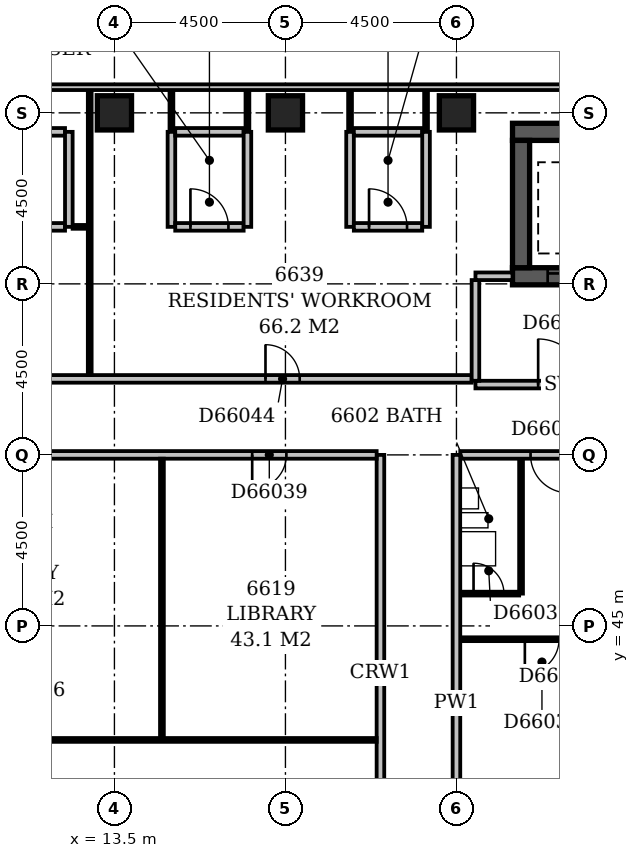
"""IFC4 building model, lengths in metres.
Left out: names, types, materials, properties, quantities, classifications, styles, units other than length and angle.
Written with IfcOpenShell. Run it as: python <this file> out.ifc"""

import sys

from ifc_helpers import new_model, si_unit, direction, frame, frame_2d, origin, origin_2d, place, context, subcontext, project, spatial, rectangle, extrude, element, fill, save


model = new_model("IFC4")
c1 = context("Model", 3, precision=1e-05, world=origin(), true_north=direction((0.0, 1.0)))
c2 = subcontext(c1, "Body", "Model", "MODEL_VIEW")
j1 = project(units=[si_unit("LENGTHUNIT", "METRE"), si_unit("PLANEANGLEUNIT", "RADIAN")], contexts=[c1])
p1 = place(None, origin())
s1 = spatial("IfcSite", under=j1, at=p1, CompositionType="ELEMENT")
p2 = place(p1, origin())
s2 = spatial("IfcBuilding", under=s1, at=p2, CompositionType="ELEMENT")
p3 = place(p2, frame((0.0, 0.0, 254.6)))
s3 = spatial("IfcBuildingStorey", under=s2, at=p3, CompositionType="ELEMENT", Elevation=254.6)
p4 = place(p3, frame((23.975, 54.2, -0.3), z_axis=(0.0, 0.0, 1.0), x_axis=(1.0, 0.0, 0.0)))
e1 = element("IfcWall", 1, at=p4, inside=s3, PredefinedType="SHEAR", context=c2, shape_type="SweptSolid", body=[
    extrude(rectangle(XDim=2.95, YDim=0.45, at=frame_2d((1.475, 0.0))), origin(), (0.0, 0.0, 1.0), 3.45),
])
p5 = place(p4, frame((0.925, 0.0, 0.3)))
e2 = element("IfcOpeningElement", 2, at=p5, cuts=e1, PredefinedType="OPENING", context=c2, shape_type="SweptSolid", body=[
    extrude(rectangle(XDim=1.1, YDim=2.1, at=frame_2d((0.55, 1.05))), frame((0.0, 0.237, 0.0), z_axis=(0.0, -1.0, 0.0), x_axis=(1.0, 0.0, 0.0)), (0.0, 0.0, 1.0), 0.474),
])
p6 = place(p3, frame((23.975, 58.0, -0.3), z_axis=(0.0, 0.0, 1.0), x_axis=(1.0, 0.0, 0.0)))
e3 = element("IfcWall", 3, at=p6, inside=s3, PredefinedType="SHEAR", context=c2, shape_type="SweptSolid", body=[
    extrude(rectangle(XDim=2.95, YDim=0.45, at=frame_2d((1.475, 0.0))), origin(), (0.0, 0.0, 1.0), 3.45),
])
p7 = place(p3, frame((24.2, 54.425, -0.3), z_axis=(0.0, 0.0, 1.0), x_axis=(0.0, 1.0, 0.0)))
e4 = element("IfcWall", 4, at=p7, inside=s3, PredefinedType="SHEAR", context=c2, shape_type="SweptSolid", body=[
    extrude(rectangle(XDim=3.35, YDim=0.45, at=frame_2d((1.675, 0.0))), origin(), (0.0, 0.0, 1.0), 3.45),
])
for number, where, z_axis, x_axis in (
    (5, (13.5, 58.5, -0.3), (0.0, 0.0, 1.0), (1.0, 0.0, 0.0)),
    (6, (18.0, 58.5, -0.3), (0.0, 0.0, 1.0), (1.0, 0.0, 0.0)),
    (7, (22.5, 58.5, -0.3), (0.0, 0.0, 1.0), (1.0, 0.0, 0.0)),
):
    element("IfcColumn", number, at=place(p3, frame(where, z_axis=z_axis, x_axis=x_axis)), inside=s3, PredefinedType="COLUMN", context=c2, shape_type="SweptSolid", body=[
        extrude(rectangle(XDim=0.9, YDim=0.9, at=origin_2d()), origin(), (0.0, 0.0, 1.0), 3.45),
    ])
p8 = place(p3, frame((45.6, 59.175, 0.0), z_axis=(0.0, 0.0, 1.0), x_axis=(-1.0, 0.0, 0.0)))
e8 = element("IfcWall", 8, at=p8, inside=s3, PredefinedType="STANDARD", context=c2, shape_type="SweptSolid", body=[
    extrude(rectangle(XDim=46.35, YDim=0.15, at=frame_2d((23.175, 0.0))), origin(), (0.0, 0.0, 1.0), 2.7),
])
p9 = place(p8, frame((15.734, 0.0, 0.6)))
e9 = element("IfcOpeningElement", 9, at=p9, cuts=e8, PredefinedType="OPENING", context=c2, shape_type="SweptSolid", body=[
    extrude(rectangle(XDim=2.1, YDim=1.8, at=frame_2d((1.05, 0.9))), frame((0.0, 0.087, 0.0), z_axis=(0.0, -1.0, 0.0), x_axis=(1.0, 0.0, 0.0)), (0.0, 0.0, 1.0), 0.174),
])
p10 = place(p3, frame((23.0, 51.35, 0.0), z_axis=(0.0, 0.0, 1.0), x_axis=(1.0, 0.0, 0.0)))
e10 = element("IfcWall", 10, at=p10, inside=s3, PredefinedType="PARTITIONING", context=c2, shape_type="SweptSolid", body=[
    extrude(rectangle(XDim=4.8, YDim=0.2, at=frame_2d((2.4, 0.0))), origin(), (0.0, 0.0, 1.0), 3.15),
])
p11 = place(p10, frame((1.65, 0.0, 0.0)))
e11 = element("IfcOpeningElement", 11, at=p11, cuts=e10, PredefinedType="OPENING", context=c2, shape_type="SweptSolid", body=[
    extrude(rectangle(XDim=1.2, YDim=2.1, at=frame_2d((0.6, 1.05))), frame((0.0, 0.112, 0.0), z_axis=(0.0, -1.0, 0.0), x_axis=(1.0, 0.0, 0.0)), (0.0, 0.0, 1.0), 0.224),
])
p12 = place(p3, frame((23.0, 54.2, 0.0), z_axis=(0.0, 0.0, 1.0), x_axis=(1.0, 0.0, 0.0)))
e12 = element("IfcWall", 12, at=p12, inside=s3, PredefinedType="PARTITIONING", context=c2, shape_type="SweptSolid", body=[
    extrude(rectangle(XDim=0.975, YDim=0.2, at=frame_2d((0.488, 0.0))), origin(), (0.0, 0.0, 1.0), 3.15),
])
p13 = place(p3, frame((23.0, 51.45, 0.0), z_axis=(0.0, 0.0, 1.0), x_axis=(0.0, 1.0, 0.0)))
e13 = element("IfcWall", 13, at=p13, inside=s3, PredefinedType="PARTITIONING", context=c2, shape_type="SweptSolid", body=[
    extrude(rectangle(XDim=2.65, YDim=0.2, at=frame_2d((1.325, 0.0))), origin(), (0.0, 0.0, 1.0), 3.15),
])
p14 = place(p3, frame((22.5, 36.45, 0.0), z_axis=(0.0, 0.0, 1.0), x_axis=(0.0, 1.0, 0.0)))
e14 = element("IfcWall", 14, at=p14, inside=s3, PredefinedType="PARTITIONING", context=c2, shape_type="SweptSolid", body=[
    extrude(rectangle(XDim=13.05, YDim=0.2, at=frame_2d((6.525, 0.0))), origin(), (0.0, 0.0, 1.0), 3.15),
])
p15 = place(p3, frame((20.5, 38.0, 0.0), z_axis=(0.0, 0.0, 1.0), x_axis=(0.0, 1.0, 0.0)))
e15 = element("IfcWall", 15, at=p15, inside=s3, PredefinedType="PARTITIONING", context=c2, shape_type="SweptSolid", body=[
    extrude(rectangle(XDim=11.5, YDim=0.2, at=frame_2d((5.75, 0.0))), origin(), (0.0, 0.0, 1.0), 3.15),
])
p16 = place(p3, frame((9.1, 42.0, 0.0), z_axis=(0.0, 0.0, 1.0), x_axis=(1.0, 0.0, 0.0)))
e16 = element("IfcWall", 16, at=p16, inside=s3, PredefinedType="PARTITIONING", context=c2, shape_type="SweptSolid", body=[
    extrude(rectangle(XDim=11.3, YDim=0.1, at=frame_2d((5.65, 0.0))), origin(), (0.0, 0.0, 1.0), 3.15),
])
p17 = place(p3, frame((14.75, 42.05, 0.0), z_axis=(0.0, 0.0, 1.0), x_axis=(0.0, 1.0, 0.0)))
e17 = element("IfcWall", 17, at=p17, inside=s3, PredefinedType="PARTITIONING", context=c2, shape_type="SweptSolid", body=[
    extrude(rectangle(XDim=7.35, YDim=0.1, at=frame_2d((3.675, 0.0))), origin(), (0.0, 0.0, 1.0), 3.15),
])
p18 = place(p3, frame((22.6, 44.65, 0.0), z_axis=(0.0, 0.0, 1.0), x_axis=(1.0, 0.0, 0.0)))
e18 = element("IfcWall", 18, at=p18, inside=s3, PredefinedType="PARTITIONING", context=c2, shape_type="SweptSolid", body=[
    extrude(rectangle(XDim=4.3, YDim=0.1, at=frame_2d((2.15, 0.0))), origin(), (0.0, 0.0, 1.0), 3.15),
])
p19 = place(p18, frame((1.7, 0.0, 0.0)))
e19 = element("IfcOpeningElement", 19, at=p19, cuts=e18, PredefinedType="OPENING", context=c2, shape_type="SweptSolid", body=[
    extrude(rectangle(XDim=0.9, YDim=2.1, at=frame_2d((0.45, 1.05))), frame((0.0, 0.062, 0.0), z_axis=(0.0, -1.0, 0.0), x_axis=(1.0, 0.0, 0.0)), (0.0, 0.0, 1.0), 0.124),
])
p20 = place(p3, frame((22.6, 45.85, 0.0), z_axis=(0.0, 0.0, 1.0), x_axis=(1.0, 0.0, 0.0)))
e20 = element("IfcWall", 20, at=p20, inside=s3, PredefinedType="PARTITIONING", context=c2, shape_type="SweptSolid", body=[
    extrude(rectangle(XDim=1.55, YDim=0.1, at=frame_2d((0.775, 0.0))), origin(), (0.0, 0.0, 1.0), 3.15),
])
p21 = place(p20, frame((0.35, 0.0, 0.0)))
e21 = element("IfcOpeningElement", 21, at=p21, cuts=e20, PredefinedType="OPENING", context=c2, shape_type="SweptSolid", body=[
    extrude(rectangle(XDim=0.8, YDim=2.1, at=frame_2d((0.4, 1.05))), frame((0.0, 0.062, 0.0), z_axis=(0.0, -1.0, 0.0), x_axis=(1.0, 0.0, 0.0)), (0.0, 0.0, 1.0), 0.124),
])
p22 = place(p3, frame((24.2, 45.85, 0.0), z_axis=(0.0, 0.0, 1.0), x_axis=(0.0, 1.0, 0.0)))
e22 = element("IfcWall", 22, at=p22, inside=s3, PredefinedType="PLUMBINGWALL", context=c2, shape_type="SweptSolid", body=[
    extrude(rectangle(XDim=3.55, YDim=0.1, at=frame_2d((1.775, 0.0))), origin(), (0.0, 0.0, 1.0), 3.15),
])
p23 = place(p3, frame((9.1, 49.5, 0.0), z_axis=(0.0, 0.0, 1.0), x_axis=(1.0, 0.0, 0.0)))
e23 = element("IfcWall", 23, at=p23, inside=s3, PredefinedType="PARTITIONING", context=c2, shape_type="SweptSolid", body=[
    extrude(rectangle(XDim=11.3, YDim=0.2, at=frame_2d((5.65, 0.0))), origin(), (0.0, 0.0, 1.0), 3.15),
])
p24 = place(p23, frame((8.025, 0.0, 0.0)))
e24 = element("IfcOpeningElement", 24, at=p24, cuts=e23, PredefinedType="OPENING", context=c2, shape_type="SweptSolid", body=[
    extrude(rectangle(XDim=0.9, YDim=2.1, at=frame_2d((0.45, 1.05))), frame((0.0, 0.112, 0.0), z_axis=(0.0, -1.0, 0.0), x_axis=(1.0, 0.0, 0.0)), (0.0, 0.0, 1.0), 0.224),
])
p25 = place(p3, frame((22.6, 49.5, 0.0), z_axis=(0.0, 0.0, 1.0), x_axis=(1.0, 0.0, 0.0)))
e25 = element("IfcWall", 25, at=p25, inside=s3, PredefinedType="PARTITIONING", context=c2, shape_type="SweptSolid", body=[
    extrude(rectangle(XDim=21.95, YDim=0.2, at=frame_2d((10.975, 0.0))), origin(), (0.0, 0.0, 1.0), 3.15),
])
p26 = place(p25, frame((1.85, 0.0, 0.0)))
e26 = element("IfcOpeningElement", 26, at=p26, cuts=e25, PredefinedType="OPENING", context=c2, shape_type="SweptSolid", body=[
    extrude(rectangle(XDim=1.0, YDim=2.1, at=frame_2d((0.5, 1.05))), frame((0.0, 0.112, 0.0), z_axis=(0.0, -1.0, 0.0), x_axis=(1.0, 0.0, 0.0)), (0.0, 0.0, 1.0), 0.224),
])
p27 = place(p25, frame((9.7, 0.0, 0.0)))
e27 = element("IfcOpeningElement", 27, at=p27, cuts=e25, PredefinedType="OPENING", context=c2, shape_type="SweptSolid", body=[
    extrude(rectangle(XDim=1.0, YDim=2.1, at=frame_2d((0.5, 1.05))), frame((0.0, 0.112, 0.0), z_axis=(0.0, -1.0, 0.0), x_axis=(1.0, 0.0, 0.0)), (0.0, 0.0, 1.0), 0.224),
])
p28 = place(p25, frame((15.05, 0.0, 0.0)))
e28 = element("IfcOpeningElement", 28, at=p28, cuts=e25, PredefinedType="OPENING", context=c2, shape_type="SweptSolid", body=[
    extrude(rectangle(XDim=1.0, YDim=2.1, at=frame_2d((0.5, 1.05))), frame((0.0, 0.112, 0.0), z_axis=(0.0, -1.0, 0.0), x_axis=(1.0, 0.0, 0.0)), (0.0, 0.0, 1.0), 0.224),
])
p29 = place(p3, frame((7.6, 51.5, 0.0), z_axis=(0.0, 0.0, 1.0), x_axis=(1.0, 0.0, 0.0)))
e29 = element("IfcWall", 29, at=p29, inside=s3, PredefinedType="PARTITIONING", context=c2, shape_type="SweptSolid", body=[
    extrude(rectangle(XDim=15.3, YDim=0.2, at=frame_2d((7.65, 0.0))), origin(), (0.0, 0.0, 1.0), 3.15),
])
p30 = place(p29, frame((2.075, 0.0, 0.0)))
e30 = element("IfcOpeningElement", 30, at=p30, cuts=e29, PredefinedType="OPENING", context=c2, shape_type="SweptSolid", body=[
    extrude(rectangle(XDim=1.0, YDim=2.1, at=frame_2d((0.5, 1.05))), frame((0.0, 0.112, 0.0), z_axis=(0.0, -1.0, 0.0), x_axis=(1.0, 0.0, 0.0)), (0.0, 0.0, 1.0), 0.224),
])
p31 = place(p29, frame((9.875, 0.0, 0.0)))
e31 = element("IfcOpeningElement", 31, at=p31, cuts=e29, PredefinedType="OPENING", context=c2, shape_type="SweptSolid", body=[
    extrude(rectangle(XDim=0.9, YDim=2.1, at=frame_2d((0.45, 1.05))), frame((0.0, 0.112, 0.0), z_axis=(0.0, -1.0, 0.0), x_axis=(1.0, 0.0, 0.0)), (0.0, 0.0, 1.0), 0.224),
])
p32 = place(p3, frame((12.85, 51.6, 0.0), z_axis=(0.0, 0.0, 1.0), x_axis=(0.0, 1.0, 0.0)))
e32 = element("IfcWall", 32, at=p32, inside=s3, PredefinedType="PARTITIONING", context=c2, shape_type="SweptSolid", body=[
    extrude(rectangle(XDim=7.5, YDim=0.1, at=frame_2d((3.75, 0.0))), origin(), (0.0, 0.0, 1.0), 3.15),
])
p33 = place(p3, frame((10.4, 55.5, 0.0), z_axis=(0.0, 0.0, 1.0), x_axis=(1.0, 0.0, 0.0)))
e33 = element("IfcWall", 33, at=p33, inside=s3, PredefinedType="PARTITIONING", context=c2, shape_type="SweptSolid", body=[
    extrude(rectangle(XDim=1.8, YDim=0.2, at=frame_2d((0.9, 0.0))), origin(), (0.0, 0.0, 1.0), 3.15),
])
p34 = place(p33, frame((0.4, 0.0, 0.0)))
e34 = element("IfcOpeningElement", 34, at=p34, cuts=e33, PredefinedType="OPENING", context=c2, shape_type="SweptSolid", body=[
    extrude(rectangle(XDim=1.0, YDim=2.1, at=frame_2d((0.5, 1.05))), frame((0.0, 0.112, 0.0), z_axis=(0.0, -1.0, 0.0), x_axis=(1.0, 0.0, 0.0)), (0.0, 0.0, 1.0), 0.224),
])
p35 = place(p3, frame((12.3, 55.5, 0.0), z_axis=(0.0, 0.0, 1.0), x_axis=(0.0, 1.0, 0.0)))
e35 = element("IfcWall", 35, at=p35, inside=s3, PredefinedType="PARTITIONING", context=c2, shape_type="SweptSolid", body=[
    extrude(rectangle(XDim=2.5, YDim=0.2, at=frame_2d((1.25, 0.0))), origin(), (0.0, 0.0, 1.0), 3.15),
])
p36 = place(p3, frame((12.4, 55.5, 0.0), z_axis=(0.0, 0.0, 1.0), x_axis=(1.0, 0.0, 0.0)))
e36 = element("IfcWall", 36, at=p36, inside=s3, PredefinedType="PARTITIONING", context=c2, shape_type="SweptSolid", body=[
    extrude(rectangle(XDim=0.4, YDim=0.1, at=frame_2d((0.2, 0.0))), origin(), (0.0, 0.0, 1.0), 3.15),
])
p37 = place(p3, frame((15.0, 55.5, 0.0), z_axis=(0.0, 0.0, 1.0), x_axis=(0.0, 1.0, 0.0)))
e37 = element("IfcWall", 37, at=p37, inside=s3, PredefinedType="PARTITIONING", context=c2, shape_type="SweptSolid", body=[
    extrude(rectangle(XDim=2.5, YDim=0.2, at=frame_2d((1.25, 0.0))), origin(), (0.0, 0.0, 1.0), 3.15),
])
p38 = place(p3, frame((15.1, 55.5, 0.0), z_axis=(0.0, 0.0, 1.0), x_axis=(1.0, 0.0, 0.0)))
e38 = element("IfcWall", 38, at=p38, inside=s3, PredefinedType="PARTITIONING", context=c2, shape_type="SweptSolid", body=[
    extrude(rectangle(XDim=1.8, YDim=0.2, at=frame_2d((0.9, 0.0))), origin(), (0.0, 0.0, 1.0), 3.15),
])
p39 = place(p38, frame((0.4, 0.0, 0.0)))
e39 = element("IfcOpeningElement", 39, at=p39, cuts=e38, PredefinedType="OPENING", context=c2, shape_type="SweptSolid", body=[
    extrude(rectangle(XDim=1.0, YDim=2.1, at=frame_2d((0.5, 1.05))), frame((0.0, 0.112, 0.0), z_axis=(0.0, -1.0, 0.0), x_axis=(1.0, 0.0, 0.0)), (0.0, 0.0, 1.0), 0.224),
])
for number, where, z_axis, x_axis in (
    (40, (17.0, 55.5, 0.0), (0.0, 0.0, 1.0), (0.0, 1.0, 0.0)),
    (41, (19.7, 55.5, 0.0), (0.0, 0.0, 1.0), (0.0, 1.0, 0.0)),
):
    element("IfcWall", number, at=place(p3, frame(where, z_axis=z_axis, x_axis=x_axis)), inside=s3, PredefinedType="PARTITIONING", context=c2, shape_type="SweptSolid", body=[
        extrude(rectangle(XDim=2.5, YDim=0.2, at=frame_2d((1.25, 0.0))), origin(), (0.0, 0.0, 1.0), 3.15),
    ])
p40 = place(p3, frame((19.8, 55.5, 0.0), z_axis=(0.0, 0.0, 1.0), x_axis=(1.0, 0.0, 0.0)))
e42 = element("IfcWall", 42, at=p40, inside=s3, PredefinedType="PARTITIONING", context=c2, shape_type="SweptSolid", body=[
    extrude(rectangle(XDim=1.8, YDim=0.2, at=frame_2d((0.9, 0.0))), origin(), (0.0, 0.0, 1.0), 3.15),
])
p41 = place(p40, frame((0.4, 0.0, 0.0)))
e43 = element("IfcOpeningElement", 43, at=p41, cuts=e42, PredefinedType="OPENING", context=c2, shape_type="SweptSolid", body=[
    extrude(rectangle(XDim=1.0, YDim=2.1, at=frame_2d((0.5, 1.05))), frame((0.0, 0.112, 0.0), z_axis=(0.0, -1.0, 0.0), x_axis=(1.0, 0.0, 0.0)), (0.0, 0.0, 1.0), 0.224),
])
p42 = place(p3, frame((21.7, 55.5, 0.0), z_axis=(0.0, 0.0, 1.0), x_axis=(0.0, 1.0, 0.0)))
e44 = element("IfcWall", 44, at=p42, inside=s3, PredefinedType="PARTITIONING", context=c2, shape_type="SweptSolid", body=[
    extrude(rectangle(XDim=2.5, YDim=0.2, at=frame_2d((1.25, 0.0))), origin(), (0.0, 0.0, 1.0), 3.15),
])
p43 = place(p3, frame((10.4, 58.0, 0.0), z_axis=(0.0, 0.0, 1.0), x_axis=(1.0, 0.0, 0.0)))
e45 = element("IfcWall", 45, at=p43, inside=s3, PredefinedType="PARTITIONING", context=c2, shape_type="SweptSolid", body=[
    extrude(rectangle(XDim=1.8, YDim=0.2, at=frame_2d((0.9, 0.0))), origin(), (0.0, 0.0, 1.0), 3.15),
])
p44 = place(p3, frame((15.0, 58.0, 0.0), z_axis=(0.0, 0.0, 1.0), x_axis=(0.0, 1.0, 0.0)))
e46 = element("IfcWall", 46, at=p44, inside=s3, PredefinedType="PARTITIONING", context=c2, shape_type="SweptSolid", body=[
    extrude(rectangle(XDim=1.1, YDim=0.1, at=frame_2d((0.55, 0.0))), origin(), (0.0, 0.0, 1.0), 3.15),
])
p45 = place(p3, frame((15.1, 58.0, 0.0), z_axis=(0.0, 0.0, 1.0), x_axis=(1.0, 0.0, 0.0)))
e47 = element("IfcWall", 47, at=p45, inside=s3, PredefinedType="PARTITIONING", context=c2, shape_type="SweptSolid", body=[
    extrude(rectangle(XDim=1.8, YDim=0.2, at=frame_2d((0.9, 0.0))), origin(), (0.0, 0.0, 1.0), 3.15),
])
for number, where, z_axis, x_axis in (
    (48, (17.0, 58.0, 0.0), (0.0, 0.0, 1.0), (0.0, 1.0, 0.0)),
    (49, (19.7, 58.0, 0.0), (0.0, 0.0, 1.0), (0.0, 1.0, 0.0)),
):
    element("IfcWall", number, at=place(p3, frame(where, z_axis=z_axis, x_axis=x_axis)), inside=s3, PredefinedType="PARTITIONING", context=c2, shape_type="SweptSolid", body=[
        extrude(rectangle(XDim=1.1, YDim=0.1, at=frame_2d((0.55, 0.0))), origin(), (0.0, 0.0, 1.0), 3.15),
    ])
p46 = place(p3, frame((19.8, 58.0, 0.0), z_axis=(0.0, 0.0, 1.0), x_axis=(1.0, 0.0, 0.0)))
e50 = element("IfcWall", 50, at=p46, inside=s3, PredefinedType="PARTITIONING", context=c2, shape_type="SweptSolid", body=[
    extrude(rectangle(XDim=1.8, YDim=0.2, at=frame_2d((0.9, 0.0))), origin(), (0.0, 0.0, 1.0), 3.15),
])
p47 = place(p3, frame((21.7, 58.0, 0.0), z_axis=(0.0, 0.0, 1.0), x_axis=(0.0, 1.0, 0.0)))
e51 = element("IfcWall", 51, at=p47, inside=s3, PredefinedType="PARTITIONING", context=c2, shape_type="SweptSolid", body=[
    extrude(rectangle(XDim=1.1, YDim=0.1, at=frame_2d((0.55, 0.0))), origin(), (0.0, 0.0, 1.0), 3.15),
])
p48 = place(p11, origin())
e52 = element("IfcDoor", 52, at=p48, inside=s3, OperationType="SINGLE_SWING_LEFT", PredefinedType="DOOR", context=c2, shape_type="SweptSolid", body=[
    extrude(rectangle(XDim=1.2, YDim=2.1, at=frame_2d((0.6, 1.05))), frame((0.0, 0.025, 0.0), z_axis=(0.0, -1.0, 0.0), x_axis=(1.0, 0.0, 0.0)), (0.0, 0.0, 1.0), 0.05),
])
fill(e11, e52)
p49 = place(p5, origin())
e53 = element("IfcDoor", 53, at=p49, inside=s3, OperationType="SLIDING_TO_LEFT", PredefinedType="DOOR", context=c2, shape_type="SweptSolid", body=[
    extrude(rectangle(XDim=1.1, YDim=2.1, at=frame_2d((0.55, 1.05))), frame((0.0, 0.025, 0.0), z_axis=(0.0, -1.0, 0.0), x_axis=(1.0, 0.0, 0.0)), (0.0, 0.0, 1.0), 0.05),
])
fill(e2, e53)
p50 = place(p19, frame((0.9, 0.0, 0.0), z_axis=(0.0, 0.0, 1.0), x_axis=(-1.0, 0.0, 0.0)))
e54 = element("IfcDoor", 54, at=p50, inside=s3, OperationType="SINGLE_SWING_RIGHT", PredefinedType="DOOR", context=c2, shape_type="SweptSolid", body=[
    extrude(rectangle(XDim=0.9, YDim=2.1, at=frame_2d((0.45, 1.05))), frame((0.0, 0.025, 0.0), z_axis=(0.0, -1.0, 0.0), x_axis=(1.0, 0.0, 0.0)), (0.0, 0.0, 1.0), 0.05),
])
fill(e19, e54)
p51 = place(p21, origin())
e55 = element("IfcDoor", 55, at=p51, inside=s3, OperationType="SINGLE_SWING_LEFT", PredefinedType="DOOR", context=c2, shape_type="SweptSolid", body=[
    extrude(rectangle(XDim=0.8, YDim=2.1, at=frame_2d((0.4, 1.05))), frame((0.0, 0.025, 0.0), z_axis=(0.0, -1.0, 0.0), x_axis=(1.0, 0.0, 0.0)), (0.0, 0.0, 1.0), 0.05),
])
fill(e21, e55)
p52 = place(p24, frame((0.9, 0.0, 0.0), z_axis=(0.0, 0.0, 1.0), x_axis=(-1.0, 0.0, 0.0)))
e56 = element("IfcDoor", 56, at=p52, inside=s3, OperationType="SINGLE_SWING_RIGHT", PredefinedType="DOOR", context=c2, shape_type="SweptSolid", body=[
    extrude(rectangle(XDim=0.9, YDim=2.1, at=frame_2d((0.45, 1.05))), frame((0.0, 0.025, 0.0), z_axis=(0.0, -1.0, 0.0), x_axis=(1.0, 0.0, 0.0)), (0.0, 0.0, 1.0), 0.05),
])
fill(e24, e56)
p53 = place(p26, origin())
e57 = element("IfcDoor", 57, at=p53, inside=s3, OperationType="SINGLE_SWING_RIGHT", PredefinedType="DOOR", context=c2, shape_type="SweptSolid", body=[
    extrude(rectangle(XDim=1.0, YDim=2.1, at=frame_2d((0.5, 1.05))), frame((0.0, 0.025, 0.0), z_axis=(0.0, -1.0, 0.0), x_axis=(1.0, 0.0, 0.0)), (0.0, 0.0, 1.0), 0.05),
])
fill(e26, e57)
p54 = place(p31, origin())
e58 = element("IfcDoor", 58, at=p54, inside=s3, OperationType="SINGLE_SWING_LEFT", PredefinedType="DOOR", context=c2, shape_type="SweptSolid", body=[
    extrude(rectangle(XDim=0.9, YDim=2.1, at=frame_2d((0.45, 1.05))), frame((0.0, 0.025, 0.0), z_axis=(0.0, -1.0, 0.0), x_axis=(1.0, 0.0, 0.0)), (0.0, 0.0, 1.0), 0.05),
])
fill(e31, e58)
p55 = place(p39, origin())
e59 = element("IfcDoor", 59, at=p55, inside=s3, OperationType="SINGLE_SWING_LEFT", PredefinedType="DOOR", context=c2, shape_type="SweptSolid", body=[
    extrude(rectangle(XDim=1.0, YDim=2.1, at=frame_2d((0.5, 1.05))), frame((0.0, 0.025, 0.0), z_axis=(0.0, -1.0, 0.0), x_axis=(1.0, 0.0, 0.0)), (0.0, 0.0, 1.0), 0.05),
])
fill(e39, e59)
p56 = place(p41, origin())
e60 = element("IfcDoor", 60, at=p56, inside=s3, OperationType="SINGLE_SWING_LEFT", PredefinedType="DOOR", context=c2, shape_type="SweptSolid", body=[
    extrude(rectangle(XDim=1.0, YDim=2.1, at=frame_2d((0.5, 1.05))), frame((0.0, 0.025, 0.0), z_axis=(0.0, -1.0, 0.0), x_axis=(1.0, 0.0, 0.0)), (0.0, 0.0, 1.0), 0.05),
])
fill(e43, e60)
save(model, sys.argv[1])
